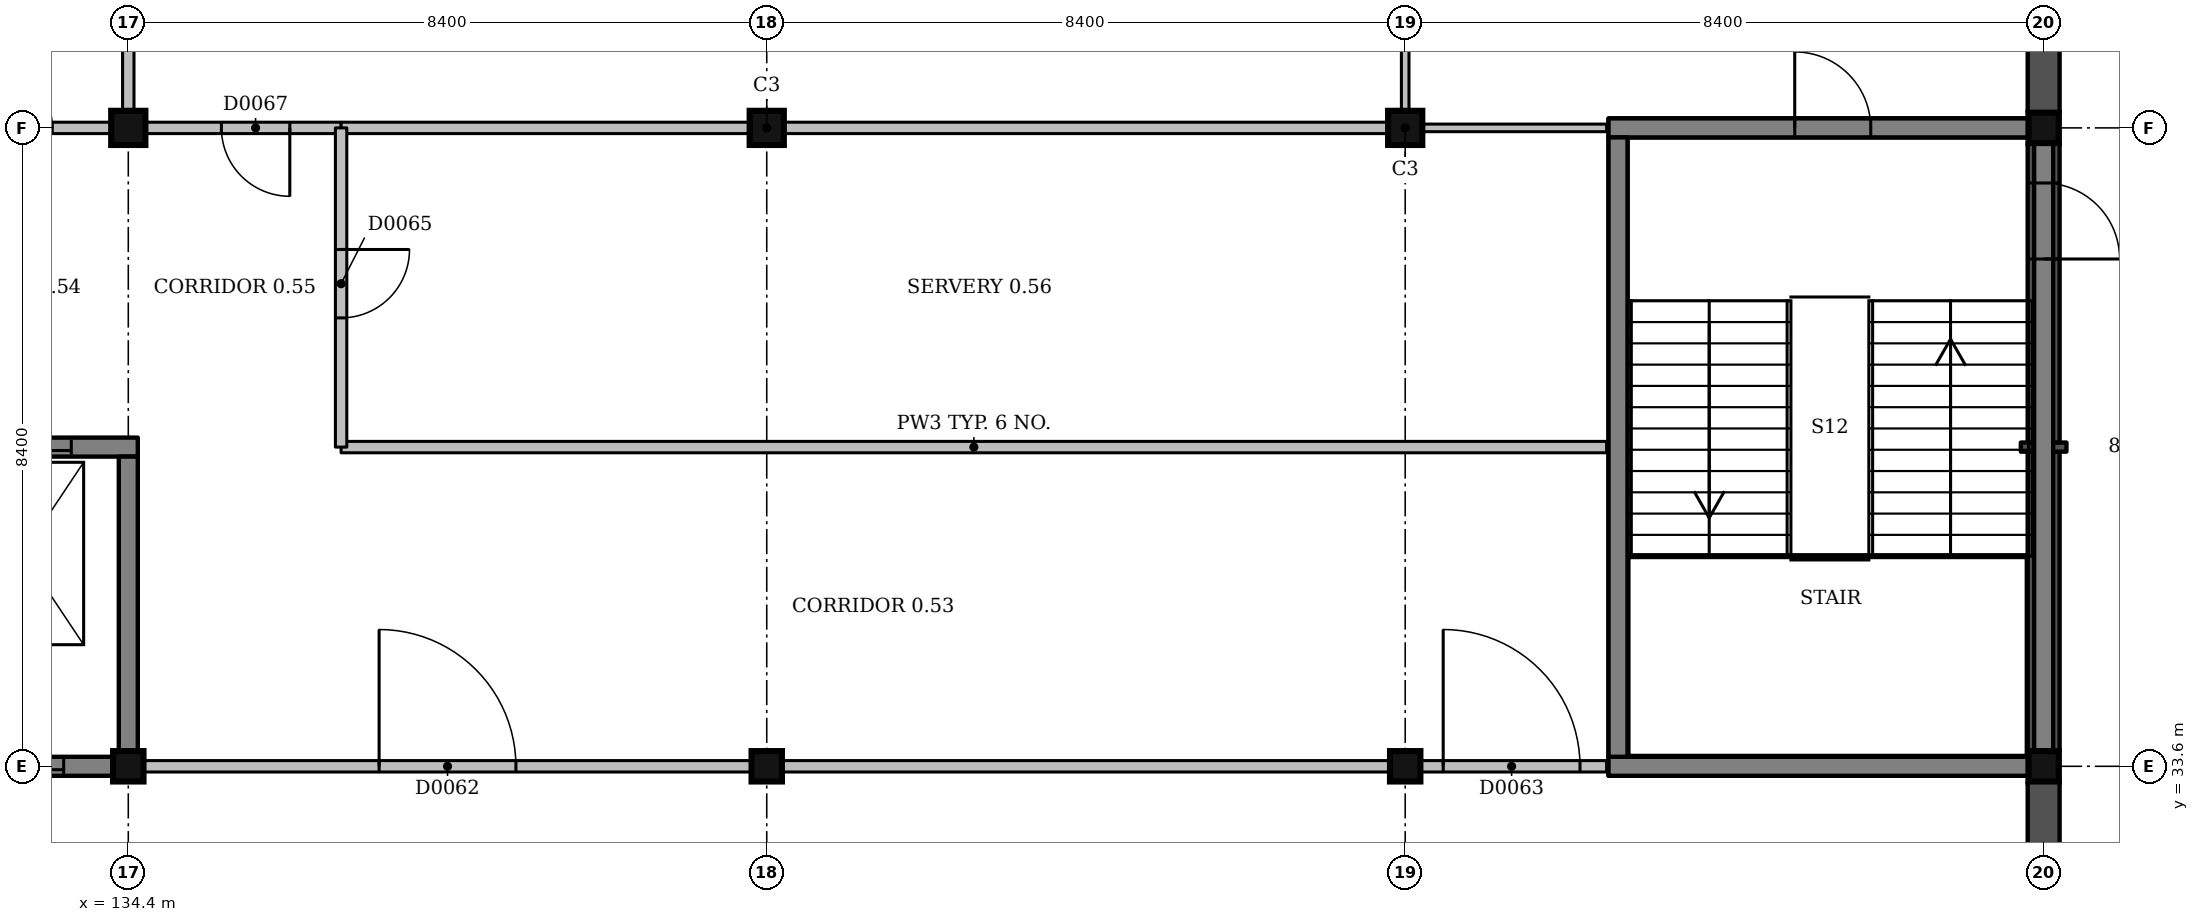
"""IFC4 building model, lengths in metres.
Left out: names, types, materials, properties, quantities, classifications, styles, units other than length and angle.
Written with IfcOpenShell. Run it as: python <this file> out.ifc"""

import sys

from ifc_helpers import new_model, si_unit, direction, frame, frame_2d, origin, origin_2d, place, context, subcontext, project, spatial, rectangle, extrude, element, fill, save


model = new_model("IFC4")
c1 = context("Model", 3, precision=1e-05, world=origin(), true_north=direction((0.0, 1.0)))
c2 = subcontext(c1, "Body", "Model", "MODEL_VIEW")
j1 = project(units=[si_unit("LENGTHUNIT", "METRE"), si_unit("PLANEANGLEUNIT", "RADIAN")], contexts=[c1])
p1 = place(None, origin())
s1 = spatial("IfcSite", under=j1, at=p1, CompositionType="ELEMENT")
p2 = place(p1, origin())
s2 = spatial("IfcBuilding", under=s1, at=p2, CompositionType="ELEMENT")
p3 = place(p2, origin())
s3 = spatial("IfcBuildingStorey", under=s2, at=p3, CompositionType="ELEMENT", Elevation=0.0)
p4 = place(p3, frame((134.4, 33.6, -1.5), z_axis=(0.0, 0.0, 1.0), x_axis=(1.0, 0.0, 0.0)))
e1 = element("IfcColumn", 1, at=p4, inside=s3, PredefinedType="COLUMN", context=c2, shape_type="SweptSolid", body=[
    extrude(rectangle(XDim=0.4, YDim=0.4, at=origin_2d()), origin(), (0.0, 0.0, 1.0), 6.0),
])
p5 = place(p3, frame((134.4, 42.0, -1.5), z_axis=(0.0, 0.0, 1.0), x_axis=(1.0, 0.0, 0.0)))
e2 = element("IfcColumn", 2, at=p5, inside=s3, PredefinedType="COLUMN", context=c2, shape_type="SweptSolid", body=[
    extrude(rectangle(XDim=0.45, YDim=0.45, at=origin_2d()), origin(), (0.0, 0.0, 1.0), 6.0),
])
p6 = place(p3, frame((142.8, 33.6, -1.5), z_axis=(0.0, 0.0, 1.0), x_axis=(1.0, 0.0, 0.0)))
e3 = element("IfcColumn", 3, at=p6, inside=s3, PredefinedType="COLUMN", context=c2, shape_type="SweptSolid", body=[
    extrude(rectangle(XDim=0.4, YDim=0.4, at=origin_2d()), origin(), (0.0, 0.0, 1.0), 6.0),
])
p7 = place(p3, frame((142.8, 42.0, -1.5), z_axis=(0.0, 0.0, 1.0), x_axis=(1.0, 0.0, 0.0)))
e4 = element("IfcColumn", 4, at=p7, inside=s3, PredefinedType="COLUMN", context=c2, shape_type="SweptSolid", body=[
    extrude(rectangle(XDim=0.45, YDim=0.45, at=origin_2d()), origin(), (0.0, 0.0, 1.0), 6.0),
])
p8 = place(p3, frame((151.2, 33.6, -1.5), z_axis=(0.0, 0.0, 1.0), x_axis=(1.0, 0.0, 0.0)))
e5 = element("IfcColumn", 5, at=p8, inside=s3, PredefinedType="COLUMN", context=c2, shape_type="SweptSolid", body=[
    extrude(rectangle(XDim=0.4, YDim=0.4, at=origin_2d()), origin(), (0.0, 0.0, 1.0), 6.0),
])
p9 = place(p3, frame((151.2, 42.0, -1.5), z_axis=(0.0, 0.0, 1.0), x_axis=(1.0, 0.0, 0.0)))
e6 = element("IfcColumn", 6, at=p9, inside=s3, PredefinedType="COLUMN", context=c2, shape_type="SweptSolid", body=[
    extrude(rectangle(XDim=0.45, YDim=0.45, at=origin_2d()), origin(), (0.0, 0.0, 1.0), 6.0),
])
for number, where, z_axis, x_axis in (
    (7, (159.6, 33.6, -1.5), (0.0, 0.0, 1.0), (1.0, 0.0, 0.0)),
    (8, (159.6, 42.0, -1.5), (0.0, 0.0, 1.0), (1.0, 0.0, 0.0)),
):
    element("IfcColumn", number, at=place(p3, frame(where, z_axis=z_axis, x_axis=x_axis)), inside=s3, PredefinedType="COLUMN", context=c2, shape_type="SweptSolid", body=[
        extrude(rectangle(XDim=0.4, YDim=0.4, at=origin_2d()), origin(), (0.0, 0.0, 1.0), 6.0),
    ])
p10 = place(p3, frame((131.5, 33.6, 0.0), z_axis=(0.0, 0.0, 1.0), x_axis=(1.0, 0.0, 0.0)))
e9 = element("IfcWall", 9, at=p10, inside=s3, PredefinedType="SHEAR", context=c2, shape_type="SweptSolid", body=[
    extrude(rectangle(XDim=2.7, YDim=0.2, at=frame_2d((1.35, 0.0))), origin(), (0.0, 0.0, 1.0), 4.5),
])
p11 = place(p10, frame((0.95, 0.0, 0.0)))
e10 = element("IfcOpeningElement", 10, at=p11, cuts=e9, PredefinedType="OPENING", context=c2, shape_type="SweptSolid", body=[
    extrude(rectangle(XDim=1.1, YDim=2.1, at=frame_2d((0.55, 1.05))), frame((0.0, 0.11, 0.0), z_axis=(0.0, -1.0, 0.0), x_axis=(1.0, 0.0, 0.0)), (0.0, 0.0, 1.0), 0.22),
])
p12 = place(p3, frame((131.5, 37.8, 0.0), z_axis=(0.0, 0.0, 1.0), x_axis=(1.0, 0.0, 0.0)))
e11 = element("IfcWall", 11, at=p12, inside=s3, PredefinedType="SHEAR", context=c2, shape_type="SweptSolid", body=[
    extrude(rectangle(XDim=3.0, YDim=0.2, at=frame_2d((1.5, 0.0))), origin(), (0.0, 0.0, 1.0), 4.5),
])
p13 = place(p12, frame((1.05, 0.0, 0.0)))
e12 = element("IfcOpeningElement", 12, at=p13, cuts=e11, PredefinedType="OPENING", context=c2, shape_type="SweptSolid", body=[
    extrude(rectangle(XDim=1.1, YDim=2.1, at=frame_2d((0.55, 1.05))), frame((0.0, 0.11, 0.0), z_axis=(0.0, -1.0, 0.0), x_axis=(1.0, 0.0, 0.0)), (0.0, 0.0, 1.0), 0.22),
])
p14 = place(p3, frame((134.4, 33.8, 0.0), z_axis=(0.0, 0.0, 1.0), x_axis=(0.0, 1.0, 0.0)))
e13 = element("IfcWall", 13, at=p14, inside=s3, PredefinedType="SHEAR", context=c2, shape_type="SweptSolid", body=[
    extrude(rectangle(XDim=3.9, YDim=0.2, at=frame_2d((1.95, 0.0))), origin(), (0.0, 0.0, 1.0), 4.5),
])
p15 = place(p3, frame((153.875, 33.6, 0.0), z_axis=(0.0, 0.0, 1.0), x_axis=(1.0, 0.0, 0.0)))
e14 = element("IfcWall", 14, at=p15, inside=s3, PredefinedType="SHEAR", context=c2, shape_type="SweptSolid", body=[
    extrude(rectangle(XDim=5.525, YDim=0.25, at=frame_2d((2.762, 0.0))), origin(), (0.0, 0.0, 1.0), 4.5),
])
p16 = place(p3, frame((153.875, 42.0, 0.0), z_axis=(0.0, 0.0, 1.0), x_axis=(1.0, 0.0, 0.0)))
e15 = element("IfcWall", 15, at=p16, inside=s3, PredefinedType="SHEAR", context=c2, shape_type="SweptSolid", body=[
    extrude(rectangle(XDim=5.525, YDim=0.25, at=frame_2d((2.762, 0.0))), origin(), (0.0, 0.0, 1.0), 4.5),
])
p17 = place(p16, frame((2.45, 0.0, 0.0)))
e16 = element("IfcOpeningElement", 16, at=p17, cuts=e15, PredefinedType="OPENING", context=c2, shape_type="SweptSolid", body=[
    extrude(rectangle(XDim=1.0, YDim=2.1, at=frame_2d((0.5, 1.05))), frame((0.0, 0.135, 0.0), z_axis=(0.0, -1.0, 0.0), x_axis=(1.0, 0.0, 0.0)), (0.0, 0.0, 1.0), 0.27),
])
p18 = place(p3, frame((154.0, 33.725, 0.0), z_axis=(0.0, 0.0, 1.0), x_axis=(0.0, 1.0, 0.0)))
e17 = element("IfcWall", 17, at=p18, inside=s3, PredefinedType="SHEAR", context=c2, shape_type="SweptSolid", body=[
    extrude(rectangle(XDim=8.15, YDim=0.25, at=frame_2d((4.075, 0.0))), origin(), (0.0, 0.0, 1.0), 4.5),
])
for number, where, z_axis, x_axis in (
    (18, (153.875, 33.6, -1.5), (0.0, 0.0, 1.0), (1.0, 0.0, 0.0)),
    (19, (153.875, 42.0, -1.5), (0.0, 0.0, 1.0), (1.0, 0.0, 0.0)),
):
    element("IfcWall", number, at=place(p3, frame(where, z_axis=z_axis, x_axis=x_axis)), inside=s3, PredefinedType="SHEAR", context=c2, shape_type="SweptSolid", body=[
        extrude(rectangle(XDim=5.85, YDim=0.25, at=frame_2d((2.925, 0.0))), origin(), (0.0, 0.0, 1.0), 1.5),
    ])
for number, where, z_axis, x_axis in (
    (20, (154.0, 33.725, -1.5), (0.0, 0.0, 1.0), (0.0, 1.0, 0.0)),
    (21, (159.6, 33.725, -1.5), (0.0, 0.0, 1.0), (0.0, 1.0, 0.0)),
):
    element("IfcWall", number, at=place(p3, frame(where, z_axis=z_axis, x_axis=x_axis)), inside=s3, PredefinedType="SHEAR", context=c2, shape_type="SweptSolid", body=[
        extrude(rectangle(XDim=8.15, YDim=0.25, at=frame_2d((4.075, 0.0))), origin(), (0.0, 0.0, 1.0), 1.5),
    ])
p19 = place(p3, frame((131.725, 33.6, -1.5), z_axis=(0.0, 0.0, 1.0), x_axis=(1.0, 0.0, 0.0)))
e22 = element("IfcWall", 22, at=p19, inside=s3, PredefinedType="SHEAR", context=c2, shape_type="SweptSolid", body=[
    extrude(rectangle(XDim=2.8, YDim=0.25, at=frame_2d((1.4, 0.0))), origin(), (0.0, 0.0, 1.0), 1.5),
])
p20 = place(p3, frame((131.61, 37.8, -1.5), z_axis=(0.0, 0.0, 1.0), x_axis=(1.0, 0.0, 0.0)))
e23 = element("IfcWall", 23, at=p20, inside=s3, PredefinedType="SHEAR", context=c2, shape_type="SweptSolid", body=[
    extrude(rectangle(XDim=2.915, YDim=0.25, at=frame_2d((1.458, 0.0))), origin(), (0.0, 0.0, 1.0), 1.5),
])
p21 = place(p3, frame((134.4, 33.725, -1.5), z_axis=(0.0, 0.0, 1.0), x_axis=(0.0, 1.0, 0.0)))
e24 = element("IfcWall", 24, at=p21, inside=s3, PredefinedType="SHEAR", context=c2, shape_type="SweptSolid", body=[
    extrude(rectangle(XDim=3.95, YDim=0.25, at=frame_2d((1.975, 0.0))), origin(), (0.0, 0.0, 1.0), 1.5),
])
p22 = place(p3, frame((159.6, 25.4, 0.0), z_axis=(0.0, 0.0, 1.0), x_axis=(0.0, 1.0, 0.0)))
e25 = element("IfcWall", 25, at=p22, inside=s3, PredefinedType="SOLIDWALL", context=c2, shape_type="SweptSolid", body=[
    extrude(rectangle(XDim=8.0, YDim=0.42, at=frame_2d((4.0, 0.0))), origin(), (0.0, 0.0, 1.0), 3.75),
])
p23 = place(p22, frame((2.65, 0.0, 0.0)))
e26 = element("IfcOpeningElement", 26, at=p23, cuts=e25, PredefinedType="OPENING", context=c2, shape_type="SweptSolid", body=[
    extrude(rectangle(XDim=2.7, YDim=2.7, at=frame_2d((1.35, 1.35))), frame((0.0, 0.22, 0.0), z_axis=(0.0, -1.0, 0.0), x_axis=(1.0, 0.0, 0.0)), (0.0, 0.0, 1.0), 0.44),
])
p24 = place(p3, frame((159.6, 33.8, 0.0), z_axis=(0.0, 0.0, 1.0), x_axis=(0.0, 1.0, 0.0)))
e27 = element("IfcWall", 27, at=p24, inside=s3, PredefinedType="SOLIDWALL", context=c2, shape_type="SweptSolid", body=[
    extrude(rectangle(XDim=3.94, YDim=0.42, at=frame_2d((1.97, 0.0))), origin(), (0.0, 0.0, 1.0), 3.75),
])
p25 = place(p3, frame((159.6, 37.74, 0.0), z_axis=(0.0, 0.0, 1.0), x_axis=(0.0, 1.0, 0.0)))
e28 = element("IfcWall", 28, at=p25, inside=s3, PredefinedType="SOLIDWALL", context=c2, shape_type="SweptSolid", body=[
    extrude(rectangle(XDim=0.12, YDim=0.6, at=frame_2d((0.06, 0.0))), origin(), (0.0, 0.0, 1.0), 3.75),
])
p26 = place(p3, frame((159.6, 37.86, 0.0), z_axis=(0.0, 0.0, 1.0), x_axis=(0.0, 1.0, 0.0)))
e29 = element("IfcWall", 29, at=p26, inside=s3, PredefinedType="SOLIDWALL", context=c2, shape_type="SweptSolid", body=[
    extrude(rectangle(XDim=3.94, YDim=0.42, at=frame_2d((1.97, 0.0))), origin(), (0.0, 0.0, 1.0), 3.75),
])
p27 = place(p26, frame((3.415, 0.0, 0.0), z_axis=(0.0, 0.0, 1.0), x_axis=(-1.0, 0.0, 0.0)))
e30 = element("IfcOpeningElement", 30, at=p27, cuts=e29, PredefinedType="OPENING", context=c2, shape_type="SweptSolid", body=[
    extrude(rectangle(XDim=1.0, YDim=2.1, at=frame_2d((0.5, 1.05))), frame((0.0, 0.22, 0.0), z_axis=(0.0, -1.0, 0.0), x_axis=(1.0, 0.0, 0.0)), (0.0, 0.0, 1.0), 0.44),
])
p28 = place(p3, frame((159.6, 42.2, 0.0), z_axis=(0.0, 0.0, 1.0), x_axis=(0.0, 1.0, 0.0)))
e31 = element("IfcWall", 31, at=p28, inside=s3, PredefinedType="SOLIDWALL", context=c2, shape_type="SweptSolid", body=[
    extrude(rectangle(XDim=3.94, YDim=0.42, at=frame_2d((1.97, 0.0))), origin(), (0.0, 0.0, 1.0), 3.5),
])
p29 = place(p28, frame((1.47, 0.0, 0.0)))
e32 = element("IfcOpeningElement", 32, at=p29, cuts=e31, PredefinedType="OPENING", context=c2, shape_type="SweptSolid", body=[
    extrude(rectangle(XDim=1.0, YDim=2.1, at=frame_2d((0.5, 1.05))), frame((0.0, 0.22, 0.0), z_axis=(0.0, -1.0, 0.0), x_axis=(1.0, 0.0, 0.0)), (0.0, 0.0, 1.0), 0.44),
])
p30 = place(p3, frame((134.6, 33.6, 0.0), z_axis=(0.0, 0.0, 1.0), x_axis=(1.0, 0.0, 0.0)))
e33 = element("IfcWall", 33, at=p30, inside=s3, PredefinedType="PARTITIONING", context=c2, shape_type="SweptSolid", body=[
    extrude(rectangle(XDim=8.0, YDim=0.15, at=frame_2d((4.0, 0.0))), origin(), (0.0, 0.0, 1.0), 3.5),
])
p31 = place(p30, frame((3.1, 0.0, 0.0)))
e34 = element("IfcOpeningElement", 34, at=p31, cuts=e33, PredefinedType="OPENING", context=c2, shape_type="SweptSolid", body=[
    extrude(rectangle(XDim=1.8, YDim=2.1, at=frame_2d((0.9, 1.05))), frame((0.0, 0.085, 0.0), z_axis=(0.0, -1.0, 0.0), x_axis=(1.0, 0.0, 0.0)), (0.0, 0.0, 1.0), 0.17),
])
p32 = place(p3, frame((143.0, 33.6, 0.0), z_axis=(0.0, 0.0, 1.0), x_axis=(1.0, 0.0, 0.0)))
e35 = element("IfcWall", 35, at=p32, inside=s3, PredefinedType="PARTITIONING", context=c2, shape_type="SweptSolid", body=[
    extrude(rectangle(XDim=8.0, YDim=0.15, at=frame_2d((4.0, 0.0))), origin(), (0.0, 0.0, 1.0), 3.5),
])
p33 = place(p3, frame((151.4, 33.6, 0.0), z_axis=(0.0, 0.0, 1.0), x_axis=(1.0, 0.0, 0.0)))
e36 = element("IfcWall", 36, at=p33, inside=s3, PredefinedType="PARTITIONING", context=c2, shape_type="SweptSolid", body=[
    extrude(rectangle(XDim=2.45, YDim=0.15, at=frame_2d((1.225, 0.0))), origin(), (0.0, 0.0, 1.0), 3.5),
])
p34 = place(p33, frame((0.3, 0.0, 0.0)))
e37 = element("IfcOpeningElement", 37, at=p34, cuts=e36, PredefinedType="OPENING", context=c2, shape_type="SweptSolid", body=[
    extrude(rectangle(XDim=1.8, YDim=2.1, at=frame_2d((0.9, 1.05))), frame((0.0, 0.085, 0.0), z_axis=(0.0, -1.0, 0.0), x_axis=(1.0, 0.0, 0.0)), (0.0, 0.0, 1.0), 0.17),
])
p35 = place(p3, frame((137.2, 37.8, 0.0), z_axis=(0.0, 0.0, 1.0), x_axis=(1.0, 0.0, 0.0)))
e38 = element("IfcWall", 38, at=p35, inside=s3, PredefinedType="PARTITIONING", context=c2, shape_type="SweptSolid", body=[
    extrude(rectangle(XDim=16.65, YDim=0.15, at=frame_2d((8.325, 0.0))), origin(), (0.0, 0.0, 1.0), 3.55),
])
p36 = place(p3, frame((134.625, 42.0, 0.0), z_axis=(0.0, 0.0, 1.0), x_axis=(1.0, 0.0, 0.0)))
e39 = element("IfcWall", 39, at=p36, inside=s3, PredefinedType="PARTITIONING", context=c2, shape_type="SweptSolid", body=[
    extrude(rectangle(XDim=2.575, YDim=0.15, at=frame_2d((1.288, 0.0))), origin(), (0.0, 0.0, 1.0), 3.55),
])
p37 = place(p36, frame((1.0, 0.0, 0.0)))
e40 = element("IfcOpeningElement", 40, at=p37, cuts=e39, PredefinedType="OPENING", context=c2, shape_type="SweptSolid", body=[
    extrude(rectangle(XDim=0.9, YDim=2.1, at=frame_2d((0.45, 1.05))), frame((0.0, 0.085, 0.0), z_axis=(0.0, -1.0, 0.0), x_axis=(1.0, 0.0, 0.0)), (0.0, 0.0, 1.0), 0.17),
])
p38 = place(p3, frame((131.75, 42.0, 0.0), z_axis=(0.0, 0.0, 1.0), x_axis=(1.0, 0.0, 0.0)))
e41 = element("IfcWall", 41, at=p38, inside=s3, PredefinedType="PARTITIONING", context=c2, shape_type="SweptSolid", body=[
    extrude(rectangle(XDim=2.425, YDim=0.15, at=frame_2d((1.212, 0.0))), origin(), (0.0, 0.0, 1.0), 3.65),
])
p39 = place(p38, frame((0.65, 0.0, 0.0)))
e42 = element("IfcOpeningElement", 42, at=p39, cuts=e41, PredefinedType="OPENING", context=c2, shape_type="SweptSolid", body=[
    extrude(rectangle(XDim=1.0, YDim=2.1, at=frame_2d((0.5, 1.05))), frame((0.0, 0.085, 0.0), z_axis=(0.0, -1.0, 0.0), x_axis=(1.0, 0.0, 0.0)), (0.0, 0.0, 1.0), 0.17),
])
p40 = place(p3, frame((151.425, 42.0, 0.0), z_axis=(0.0, 0.0, 1.0), x_axis=(1.0, 0.0, 0.0)))
e43 = element("IfcWall", 43, at=p40, inside=s3, PredefinedType="PARTITIONING", context=c2, shape_type="SweptSolid", body=[
    extrude(rectangle(XDim=2.425, YDim=0.1, at=frame_2d((1.212, 0.0))), origin(), (0.0, 0.0, 1.0), 3.65),
])
p41 = place(p3, frame((137.2, 42.0, 0.0), z_axis=(0.0, 0.0, 1.0), x_axis=(1.0, 0.0, 0.0)))
e44 = element("IfcWall", 44, at=p41, inside=s3, PredefinedType="PARTITIONING", context=c2, shape_type="SweptSolid", body=[
    extrude(rectangle(XDim=5.375, YDim=0.15, at=frame_2d((2.688, 0.0))), origin(), (0.0, 0.0, 1.0), 3.55),
])
p42 = place(p3, frame((143.025, 42.0, 0.0), z_axis=(0.0, 0.0, 1.0), x_axis=(1.0, 0.0, 0.0)))
e45 = element("IfcWall", 45, at=p42, inside=s3, PredefinedType="PARTITIONING", context=c2, shape_type="SweptSolid", body=[
    extrude(rectangle(XDim=7.95, YDim=0.15, at=frame_2d((3.975, 0.0))), origin(), (0.0, 0.0, 1.0), 3.55),
])
p43 = place(p3, frame((134.4, 42.225, 0.0), z_axis=(0.0, 0.0, 1.0), x_axis=(0.0, 1.0, 0.0)))
e46 = element("IfcWall", 46, at=p43, inside=s3, PredefinedType="PARTITIONING", context=c2, shape_type="SweptSolid", body=[
    extrude(rectangle(XDim=7.975, YDim=0.15, at=frame_2d((3.987, 0.0))), origin(), (0.0, 0.0, 1.0), 3.55),
])
p44 = place(p3, frame((137.2, 37.8, 0.0), z_axis=(0.0, 0.0, 1.0), x_axis=(0.0, 1.0, 0.0)))
e47 = element("IfcWall", 47, at=p44, inside=s3, PredefinedType="PARTITIONING", context=c2, shape_type="SweptSolid", body=[
    extrude(rectangle(XDim=4.2, YDim=0.15, at=frame_2d((2.1, 0.0))), origin(), (0.0, 0.0, 1.0), 3.55),
])
p45 = place(p44, frame((1.7, 0.0, 0.0)))
e48 = element("IfcOpeningElement", 48, at=p45, cuts=e47, PredefinedType="OPENING", context=c2, shape_type="SweptSolid", body=[
    extrude(rectangle(XDim=0.9, YDim=2.1, at=frame_2d((0.45, 1.05))), frame((0.0, 0.085, 0.0), z_axis=(0.0, -1.0, 0.0), x_axis=(1.0, 0.0, 0.0)), (0.0, 0.0, 1.0), 0.17),
])
p46 = place(p3, frame((151.2, 42.225, 0.0), z_axis=(0.0, 0.0, 1.0), x_axis=(0.0, 1.0, 0.0)))
e49 = element("IfcWall", 49, at=p46, inside=s3, PredefinedType="PARTITIONING", context=c2, shape_type="SweptSolid", body=[
    extrude(rectangle(XDim=7.975, YDim=0.1, at=frame_2d((3.987, 0.0))), origin(), (0.0, 0.0, 1.0), 3.55),
])
p47 = place(p46, frame((3.45, 0.0, 0.0)))
e50 = element("IfcOpeningElement", 50, at=p47, cuts=e49, PredefinedType="OPENING", context=c2, shape_type="SweptSolid", body=[
    extrude(rectangle(XDim=0.9, YDim=2.1, at=frame_2d((0.45, 1.05))), frame((0.0, 0.06, 0.0), z_axis=(0.0, -1.0, 0.0), x_axis=(1.0, 0.0, 0.0)), (0.0, 0.0, 1.0), 0.12),
])
p48 = place(p31, origin())
e51 = element("IfcDoor", 51, at=p48, inside=s3, OperationType="DOUBLE_DOOR_SINGLE_SWING", PredefinedType="DOOR", context=c2, shape_type="SweptSolid", body=[
    extrude(rectangle(XDim=1.8, YDim=2.1, at=frame_2d((0.9, 1.05))), frame((0.0, 0.025, 0.0), z_axis=(0.0, -1.0, 0.0), x_axis=(1.0, 0.0, 0.0)), (0.0, 0.0, 1.0), 0.05),
])
fill(e34, e51)
p49 = place(p34, origin())
e52 = element("IfcDoor", 52, at=p49, inside=s3, OperationType="DOUBLE_DOOR_SINGLE_SWING", PredefinedType="DOOR", context=c2, shape_type="SweptSolid", body=[
    extrude(rectangle(XDim=1.8, YDim=2.1, at=frame_2d((0.9, 1.05))), frame((0.0, 0.025, 0.0), z_axis=(0.0, -1.0, 0.0), x_axis=(1.0, 0.0, 0.0)), (0.0, 0.0, 1.0), 0.05),
])
fill(e37, e52)
p50 = place(p45, origin())
e53 = element("IfcDoor", 53, at=p50, inside=s3, OperationType="SINGLE_SWING_RIGHT", PredefinedType="DOOR", context=c2, shape_type="SweptSolid", body=[
    extrude(rectangle(XDim=0.9, YDim=2.1, at=frame_2d((0.45, 1.05))), frame((0.0, 0.025, 0.0), z_axis=(0.0, -1.0, 0.0), x_axis=(1.0, 0.0, 0.0)), (0.0, 0.0, 1.0), 0.05),
])
fill(e48, e53)
p51 = place(p37, origin())
e54 = element("IfcDoor", 54, at=p51, inside=s3, OperationType="SINGLE_SWING_RIGHT", PredefinedType="DOOR", context=c2, shape_type="SweptSolid", body=[
    extrude(rectangle(XDim=0.9, YDim=2.1, at=frame_2d((0.45, 1.05))), frame((0.0, 0.025, 0.0), z_axis=(0.0, -1.0, 0.0), x_axis=(1.0, 0.0, 0.0)), (0.0, 0.0, 1.0), 0.05),
])
fill(e40, e54)
p52 = place(p17, origin())
e55 = element("IfcDoor", 55, at=p52, inside=s3, OperationType="SINGLE_SWING_LEFT", PredefinedType="DOOR", context=c2, shape_type="SweptSolid", body=[
    extrude(rectangle(XDim=1.0, YDim=2.1, at=frame_2d((0.5, 1.05))), frame((0.0, 0.025, 0.0), z_axis=(0.0, -1.0, 0.0), x_axis=(1.0, 0.0, 0.0)), (0.0, 0.0, 1.0), 0.05),
])
fill(e16, e55)
p53 = place(p27, origin())
e56 = element("IfcDoor", 56, at=p53, inside=s3, OperationType="SINGLE_SWING_LEFT", PredefinedType="DOOR", context=c2, shape_type="SweptSolid", body=[
    extrude(rectangle(XDim=1.0, YDim=2.1, at=frame_2d((0.5, 1.05))), frame((0.0, 0.025, 0.0), z_axis=(0.0, -1.0, 0.0), x_axis=(1.0, 0.0, 0.0)), (0.0, 0.0, 1.0), 0.05),
])
fill(e30, e56)
p54 = place(p11, origin())
e57 = element("IfcDoor", 57, at=p54, inside=s3, OperationType="SLIDING_TO_RIGHT", PredefinedType="DOOR", context=c2, shape_type="SweptSolid", body=[
    extrude(rectangle(XDim=1.1, YDim=2.1, at=frame_2d((0.55, 1.05))), frame((0.0, 0.025, 0.0), z_axis=(0.0, -1.0, 0.0), x_axis=(1.0, 0.0, 0.0)), (0.0, 0.0, 1.0), 0.05),
])
fill(e10, e57)
p55 = place(p13, origin())
e58 = element("IfcDoor", 58, at=p55, inside=s3, OperationType="SLIDING_TO_LEFT", PredefinedType="DOOR", context=c2, shape_type="SweptSolid", body=[
    extrude(rectangle(XDim=1.1, YDim=2.1, at=frame_2d((0.55, 1.05))), frame((0.0, 0.025, 0.0), z_axis=(0.0, -1.0, 0.0), x_axis=(1.0, 0.0, 0.0)), (0.0, 0.0, 1.0), 0.05),
])
fill(e12, e58)
save(model, sys.argv[1])
